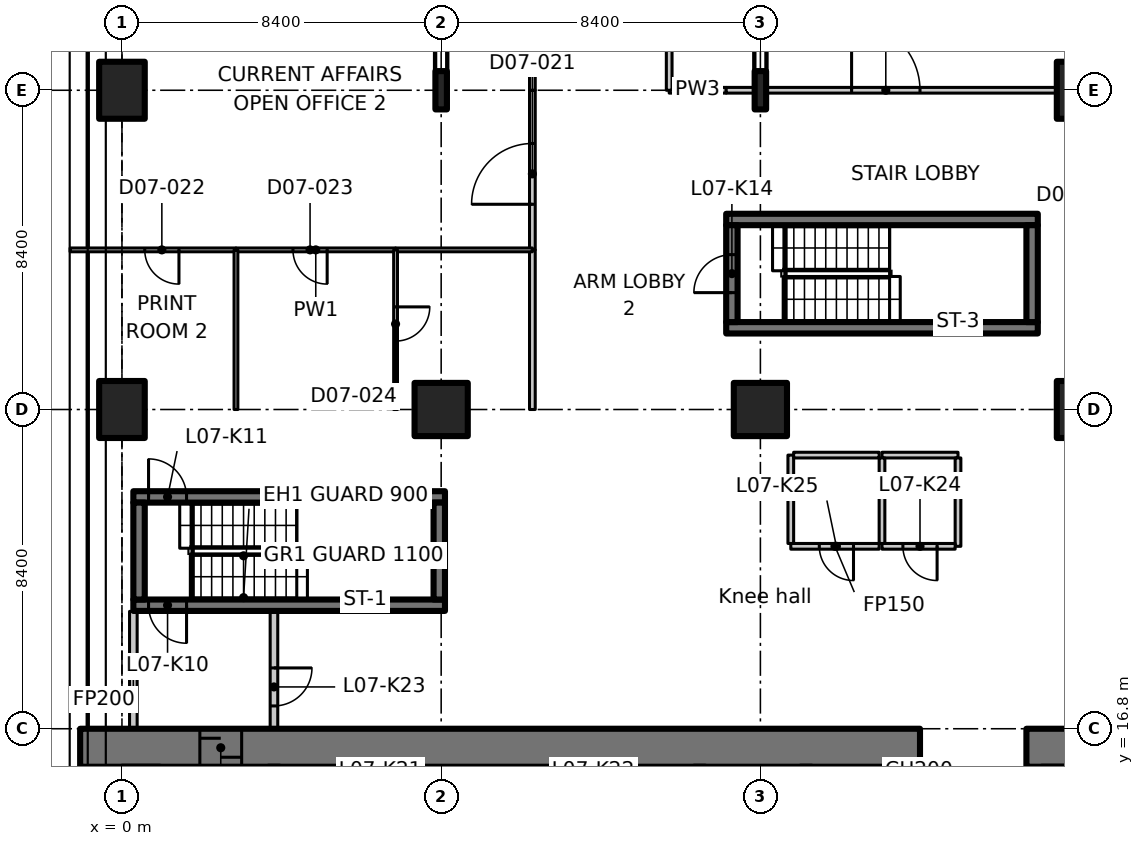
"""IFC4 building model, lengths in metres.
Left out: names, types, materials, properties, quantities, classifications, styles, units other than length and angle.
Written with IfcOpenShell. Run it as: python <this file> out.ifc"""

import sys

from ifc_helpers import new_model, si_unit, direction, frame, frame_2d, origin, origin_2d, place, context, subcontext, project, spatial, rectangle, i_section, extrude, element, fill, save


model = new_model("IFC4")
c1 = context("Model", 3, precision=1e-05, world=origin(), true_north=direction((0.0, 1.0)))
c2 = subcontext(c1, "Body", "Model", "MODEL_VIEW")
j1 = project(units=[si_unit("LENGTHUNIT", "METRE"), si_unit("PLANEANGLEUNIT", "RADIAN")], contexts=[c1])
p1 = place(None, origin())
s1 = spatial("IfcSite", under=j1, at=p1, CompositionType="ELEMENT")
p2 = place(p1, origin())
s2 = spatial("IfcBuilding", under=s1, at=p2, CompositionType="ELEMENT")
p3 = place(p2, frame((0.0, 0.0, 40.1)))
s3 = spatial("IfcBuildingStorey", under=s2, at=p3, CompositionType="ELEMENT", Elevation=40.1)
for number, where, z_axis, x_axis in (
    (1, (0.0, 25.2, 0.0), (0.0, 0.0, 1.0), (1.0, 0.0, 0.0)),
    (2, (0.0, 33.6, 0.0), (0.0, 0.0, 1.0), (1.0, 0.0, 0.0)),
):
    element("IfcColumn", number, at=place(p3, frame(where, z_axis=z_axis, x_axis=x_axis)), inside=s3, PredefinedType="COLUMN", context=c2, shape_type="SweptSolid", body=[
        extrude(rectangle(XDim=1.2, YDim=1.5, at=origin_2d()), origin(), (0.0, 0.0, 1.0), 3.35),
    ])
for number, where, z_axis, x_axis in (
    (3, (8.4, 25.2, 0.0), (0.0, 0.0, 1.0), (1.0, 0.0, 0.0)),
    (4, (16.8, 25.2, 0.0), (0.0, 0.0, 1.0), (1.0, 0.0, 0.0)),
):
    element("IfcColumn", number, at=place(p3, frame(where, z_axis=z_axis, x_axis=x_axis)), inside=s3, PredefinedType="COLUMN", context=c2, shape_type="SweptSolid", body=[
        extrude(rectangle(XDim=1.4, YDim=1.4, at=origin_2d()), origin(), (0.0, 0.0, 1.0), 3.35),
    ])
for number, where, z_axis, x_axis in (
    (5, (25.2, 25.2, 0.0), (0.0, 0.0, 1.0), (1.0, 0.0, 0.0)),
    (6, (25.2, 33.6, 0.0), (0.0, 0.0, 1.0), (1.0, 0.0, 0.0)),
):
    element("IfcColumn", number, at=place(p3, frame(where, z_axis=z_axis, x_axis=x_axis)), inside=s3, PredefinedType="COLUMN", context=c2, shape_type="SweptSolid", body=[
        extrude(rectangle(XDim=1.2, YDim=1.5, at=origin_2d()), origin(), (0.0, 0.0, 1.0), 3.35),
    ])
for number, where, z_axis, x_axis in (
    (7, (8.4, 33.6, -0.125), (0.0, 0.0, 1.0), (1.0, 0.0, 0.0)),
    (8, (16.8, 33.6, -0.125), (0.0, 0.0, 1.0), (1.0, 0.0, 0.0)),
):
    element("IfcColumn", number, at=place(p3, frame(where, z_axis=z_axis, x_axis=x_axis)), inside=s3, PredefinedType="COLUMN", context=c2, shape_type="SweptSolid", body=[
        extrude(i_section(OverallWidth=0.302, OverallDepth=1.008, WebThickness=0.021, FlangeThickness=0.04, FilletRadius=0.03, at=origin_2d()), origin(), (0.0, 0.0, 1.0), 3.475),
    ])
p4 = place(p3, frame((-1.1, 16.3, 0.0), z_axis=(0.0, 0.0, 1.0), x_axis=(1.0, 0.0, 0.0)))
e9 = element("IfcWall", 9, at=p4, inside=s3, PredefinedType="SHEAR", context=c2, shape_type="SweptSolid", body=[
    extrude(rectangle(XDim=22.1, YDim=1.0, at=frame_2d((11.05, 0.0))), origin(), (0.0, 0.0, 1.0), 3.35),
])
p5 = place(p4, frame((3.15, 0.0, 0.0)))
e10 = element("IfcOpeningElement", 10, at=p5, cuts=e9, PredefinedType="OPENING", context=c2, shape_type="SweptSolid", body=[
    extrude(rectangle(XDim=1.1, YDim=2.3, at=frame_2d((0.55, 1.15))), frame((0.0, 0.51, 0.0), z_axis=(0.0, -1.0, 0.0), x_axis=(1.0, 0.0, 0.0)), (0.0, 0.0, 1.0), 1.02),
])
p6 = place(p3, frame((23.8, 16.3, 0.0), z_axis=(0.0, 0.0, 1.0), x_axis=(1.0, 0.0, 0.0)))
e11 = element("IfcWall", 11, at=p6, inside=s3, PredefinedType="SHEAR", context=c2, shape_type="SweptSolid", body=[
    extrude(rectangle(XDim=1.4, YDim=1.0, at=frame_2d((0.7, 0.0))), origin(), (0.0, 0.0, 1.0), 3.35),
])
p7 = place(p3, frame((24.7, 12.6, 0.0), z_axis=(0.0, 0.0, 1.0), x_axis=(0.0, 1.0, 0.0)))
e12 = element("IfcWall", 12, at=p7, inside=s3, PredefinedType="SHEAR", context=c2, shape_type="SweptSolid", body=[
    extrude(rectangle(XDim=3.2, YDim=1.0, at=frame_2d((1.6, 0.0))), origin(), (0.0, 0.0, 1.0), 3.35),
])
p8 = place(p3, frame((8.5, 20.05, 0.0), z_axis=(0.0, 0.0, 1.0), x_axis=(-1.0, 0.0, 0.0)))
e13 = element("IfcWall", 13, at=p8, inside=s3, PredefinedType="SHEAR", context=c2, shape_type="SweptSolid", body=[
    extrude(rectangle(XDim=8.2, YDim=0.3, at=frame_2d((4.1, 0.0))), origin(), (0.0, 0.0, 1.0), 3.35),
])
p9 = place(p8, frame((6.8, 0.0, 0.0)))
e14 = element("IfcOpeningElement", 14, at=p9, cuts=e13, PredefinedType="OPENING", context=c2, shape_type="SweptSolid", body=[
    extrude(rectangle(XDim=1.0, YDim=2.1, at=frame_2d((0.5, 1.05))), frame((0.0, 0.16, 0.0), z_axis=(0.0, -1.0, 0.0), x_axis=(1.0, 0.0, 0.0)), (0.0, 0.0, 1.0), 0.32),
])
p10 = place(p3, frame((0.3, 22.9, 0.0), z_axis=(0.0, 0.0, 1.0), x_axis=(1.0, 0.0, 0.0)))
e15 = element("IfcWall", 15, at=p10, inside=s3, PredefinedType="SHEAR", context=c2, shape_type="SweptSolid", body=[
    extrude(rectangle(XDim=8.2, YDim=0.3, at=frame_2d((4.1, 0.0))), origin(), (0.0, 0.0, 1.0), 3.35),
])
p11 = place(p10, frame((0.4, 0.0, 0.0)))
e16 = element("IfcOpeningElement", 16, at=p11, cuts=e15, PredefinedType="OPENING", context=c2, shape_type="SweptSolid", body=[
    extrude(rectangle(XDim=1.0, YDim=2.1, at=frame_2d((0.5, 1.05))), frame((0.0, 0.16, 0.0), z_axis=(0.0, -1.0, 0.0), x_axis=(1.0, 0.0, 0.0)), (0.0, 0.0, 1.0), 0.32),
])
for number, where, z_axis, x_axis in (
    (17, (0.45, 20.2, 0.0), (0.0, 0.0, 1.0), (0.0, 1.0, 0.0)),
    (18, (8.35, 20.2, 0.0), (0.0, 0.0, 1.0), (0.0, 1.0, 0.0)),
):
    element("IfcWall", number, at=place(p3, frame(where, z_axis=z_axis, x_axis=x_axis)), inside=s3, PredefinedType="SHEAR", context=c2, shape_type="SweptSolid", body=[
        extrude(rectangle(XDim=2.55, YDim=0.3, at=frame_2d((1.275, 0.0))), origin(), (0.0, 0.0, 1.0), 3.35),
    ])
for number, where, z_axis, x_axis in (
    (19, (15.9, 27.35, 0.0), (0.0, 0.0, 1.0), (1.0, 0.0, 0.0)),
    (20, (15.9, 30.2, 0.0), (0.0, 0.0, 1.0), (1.0, 0.0, 0.0)),
):
    element("IfcWall", number, at=place(p3, frame(where, z_axis=z_axis, x_axis=x_axis)), inside=s3, PredefinedType="SHEAR", context=c2, shape_type="SweptSolid", body=[
        extrude(rectangle(XDim=8.2, YDim=0.3, at=frame_2d((4.1, 0.0))), origin(), (0.0, 0.0, 1.0), 3.35),
    ])
p12 = place(p3, frame((16.05, 27.5, 0.0), z_axis=(0.0, 0.0, 1.0), x_axis=(0.0, 1.0, 0.0)))
e21 = element("IfcWall", 21, at=p12, inside=s3, PredefinedType="SHEAR", context=c2, shape_type="SweptSolid", body=[
    extrude(rectangle(XDim=2.55, YDim=0.3, at=frame_2d((1.275, 0.0))), origin(), (0.0, 0.0, 1.0), 3.35),
])
p13 = place(p12, frame((0.775, 0.0, 0.0)))
e22 = element("IfcOpeningElement", 22, at=p13, cuts=e21, PredefinedType="OPENING", context=c2, shape_type="SweptSolid", body=[
    extrude(rectangle(XDim=1.0, YDim=2.1, at=frame_2d((0.5, 1.05))), frame((0.0, 0.16, 0.0), z_axis=(0.0, -1.0, 0.0), x_axis=(1.0, 0.0, 0.0)), (0.0, 0.0, 1.0), 0.32),
])
p14 = place(p3, frame((23.95, 27.5, 0.0), z_axis=(0.0, 0.0, 1.0), x_axis=(0.0, 1.0, 0.0)))
e23 = element("IfcWall", 23, at=p14, inside=s3, PredefinedType="SHEAR", context=c2, shape_type="SweptSolid", body=[
    extrude(rectangle(XDim=2.55, YDim=0.3, at=frame_2d((1.275, 0.0))), origin(), (0.0, 0.0, 1.0), 3.35),
])
p15 = place(p3, frame((0.3, 16.812, 0.0), z_axis=(0.0, 0.0, 1.0), x_axis=(0.0, 1.0, 0.0)))
e24 = element("IfcWall", 24, at=p15, inside=s3, PredefinedType="PARTITIONING", context=c2, shape_type="SweptSolid", body=[
    extrude(rectangle(XDim=3.076, YDim=0.2, at=frame_2d((1.538, 0.0))), origin(), (0.0, 0.0, 1.0), 2.98),
])
p16 = place(p3, frame((4.0, 19.888, 0.0), z_axis=(0.0, 0.0, 1.0), x_axis=(0.0, -1.0, 0.0)))
e25 = element("IfcWall", 25, at=p16, inside=s3, PredefinedType="PARTITIONING", context=c2, shape_type="SweptSolid", body=[
    extrude(rectangle(XDim=3.076, YDim=0.2, at=frame_2d((1.538, 0.0))), origin(), (0.0, 0.0, 1.0), 3.35),
])
p17 = place(p16, frame((1.488, 0.0, 0.0)))
e26 = element("IfcOpeningElement", 26, at=p17, cuts=e25, PredefinedType="OPENING", context=c2, shape_type="SweptSolid", body=[
    extrude(rectangle(XDim=1.0, YDim=2.1, at=frame_2d((0.5, 1.05))), frame((0.0, 0.11, 0.0), z_axis=(0.0, -1.0, 0.0), x_axis=(1.0, 0.0, 0.0)), (0.0, 0.0, 1.0), 0.22),
])
p18 = place(p3, frame((20.0, 24.0, 0.0), z_axis=(0.0, 0.0, 1.0), x_axis=(1.0, 0.0, 0.0)))
e27 = element("IfcWall", 27, at=p18, inside=s3, PredefinedType="PARTITIONING", context=c2, shape_type="SweptSolid", body=[
    extrude(rectangle(XDim=2.0, YDim=0.15, at=frame_2d((1.0, 0.0))), origin(), (0.0, 0.0, 1.0), 3.35),
])
p19 = place(p3, frame((22.0, 23.925, 0.0), z_axis=(0.0, 0.0, 1.0), x_axis=(0.0, -1.0, 0.0)))
e28 = element("IfcWall", 28, at=p19, inside=s3, PredefinedType="PARTITIONING", context=c2, shape_type="SweptSolid", body=[
    extrude(rectangle(XDim=2.325, YDim=0.15, at=frame_2d((1.163, 0.0))), origin(), (0.0, 0.0, 1.0), 3.35),
])
p20 = place(p3, frame((21.925, 21.6, 0.0), z_axis=(0.0, 0.0, 1.0), x_axis=(-1.0, 0.0, 0.0)))
e29 = element("IfcWall", 29, at=p20, inside=s3, PredefinedType="PARTITIONING", context=c2, shape_type="SweptSolid", body=[
    extrude(rectangle(XDim=1.925, YDim=0.15, at=frame_2d((0.962, 0.0))), origin(), (0.0, 0.0, 1.0), 3.35),
])
p21 = place(p20, frame((0.475, 0.0, 0.0)))
e30 = element("IfcOpeningElement", 30, at=p21, cuts=e29, PredefinedType="OPENING", context=c2, shape_type="SweptSolid", body=[
    extrude(rectangle(XDim=0.9, YDim=2.1, at=frame_2d((0.45, 1.05))), frame((0.0, 0.085, 0.0), z_axis=(0.0, -1.0, 0.0), x_axis=(1.0, 0.0, 0.0)), (0.0, 0.0, 1.0), 0.17),
])
p22 = place(p3, frame((20.0, 21.675, 0.0), z_axis=(0.0, 0.0, 1.0), x_axis=(0.0, 1.0, 0.0)))
e31 = element("IfcWall", 31, at=p22, inside=s3, PredefinedType="PARTITIONING", context=c2, shape_type="SweptSolid", body=[
    extrude(rectangle(XDim=2.25, YDim=0.15, at=frame_2d((1.125, 0.0))), origin(), (0.0, 0.0, 1.0), 3.35),
])
p23 = place(p3, frame((19.925, 21.6, 0.0), z_axis=(0.0, 0.0, 1.0), x_axis=(-1.0, 0.0, 0.0)))
e32 = element("IfcWall", 32, at=p23, inside=s3, PredefinedType="PARTITIONING", context=c2, shape_type="SweptSolid", body=[
    extrude(rectangle(XDim=2.325, YDim=0.15, at=frame_2d((1.163, 0.0))), origin(), (0.0, 0.0, 1.0), 3.35),
])
p24 = place(p23, frame((0.675, 0.0, 0.0)))
e33 = element("IfcOpeningElement", 33, at=p24, cuts=e32, PredefinedType="OPENING", context=c2, shape_type="SweptSolid", body=[
    extrude(rectangle(XDim=0.9, YDim=2.1, at=frame_2d((0.45, 1.05))), frame((0.0, 0.085, 0.0), z_axis=(0.0, -1.0, 0.0), x_axis=(1.0, 0.0, 0.0)), (0.0, 0.0, 1.0), 0.17),
])
p25 = place(p3, frame((17.6, 21.675, 0.0), z_axis=(0.0, 0.0, 1.0), x_axis=(0.0, 1.0, 0.0)))
e34 = element("IfcWall", 34, at=p25, inside=s3, PredefinedType="PARTITIONING", context=c2, shape_type="SweptSolid", body=[
    extrude(rectangle(XDim=2.325, YDim=0.15, at=frame_2d((1.163, 0.0))), origin(), (0.0, 0.0, 1.0), 3.35),
])
p26 = place(p3, frame((17.675, 24.0, 0.0), z_axis=(0.0, 0.0, 1.0), x_axis=(1.0, 0.0, 0.0)))
e35 = element("IfcWall", 35, at=p26, inside=s3, PredefinedType="PARTITIONING", context=c2, shape_type="SweptSolid", body=[
    extrude(rectangle(XDim=2.25, YDim=0.15, at=frame_2d((1.125, 0.0))), origin(), (0.0, 0.0, 1.0), 3.35),
])
p27 = place(p3, frame((10.8, 29.4, 0.0), z_axis=(0.0, 0.0, 1.0), x_axis=(0.0, 1.0, 0.0)))
e36 = element("IfcWall", 36, at=p27, inside=s3, PredefinedType="PARTITIONING", context=c2, shape_type="SweptSolid", body=[
    extrude(rectangle(XDim=4.2, YDim=0.15, at=frame_2d((2.1, 0.0))), origin(), (0.0, 0.0, 1.0), 3.33),
])
p28 = place(p27, frame((1.2, 0.0, 0.0)))
e37 = element("IfcOpeningElement", 37, at=p28, cuts=e36, PredefinedType="OPENING", context=c2, shape_type="SweptSolid", body=[
    extrude(rectangle(XDim=1.6, YDim=2.1, at=frame_2d((0.8, 1.05))), frame((0.0, 0.085, 0.0), z_axis=(0.0, -1.0, 0.0), x_axis=(1.0, 0.0, 0.0)), (0.0, 0.0, 1.0), 0.17),
])
p29 = place(p3, frame((10.8, 25.2, 0.0), z_axis=(0.0, 0.0, 1.0), x_axis=(0.0, 1.0, 0.0)))
e38 = element("IfcWall", 38, at=p29, inside=s3, PredefinedType="PARTITIONING", context=c2, shape_type="SweptSolid", body=[
    extrude(rectangle(XDim=4.2, YDim=0.15, at=frame_2d((2.1, 0.0))), origin(), (0.0, 0.0, 1.0), 3.33),
])
p30 = place(p3, frame((14.4, 33.6, 0.0), z_axis=(0.0, 0.0, 1.0), x_axis=(1.0, 0.0, 0.0)))
e39 = element("IfcWall", 39, at=p30, inside=s3, PredefinedType="PARTITIONING", context=c2, shape_type="SweptSolid", body=[
    extrude(rectangle(XDim=1.5, YDim=0.15, at=frame_2d((0.75, 0.0))), origin(), (0.0, 0.0, 1.0), 3.33),
])
p31 = place(p3, frame((15.9, 33.6, 0.0), z_axis=(0.0, 0.0, 1.0), x_axis=(1.0, 0.0, 0.0)))
e40 = element("IfcWall", 40, at=p31, inside=s3, PredefinedType="PARTITIONING", context=c2, shape_type="SweptSolid", body=[
    extrude(rectangle(XDim=8.68, YDim=0.15, at=frame_2d((4.34, 0.0))), origin(), (0.0, 0.0, 1.0), 3.33),
])
p32 = place(p31, frame((3.3, 0.0, 0.0)))
e41 = element("IfcOpeningElement", 41, at=p32, cuts=e40, PredefinedType="OPENING", context=c2, shape_type="SweptSolid", body=[
    extrude(rectangle(XDim=1.8, YDim=2.1, at=frame_2d((0.9, 1.05))), frame((0.0, 0.085, 0.0), z_axis=(0.0, -1.0, 0.0), x_axis=(1.0, 0.0, 0.0)), (0.0, 0.0, 1.0), 0.17),
])
p33 = place(p3, frame((10.8, 33.6, 0.0), z_axis=(0.0, 0.0, 1.0), x_axis=(0.0, 1.0, 0.0)))
e42 = element("IfcWall", 42, at=p33, inside=s3, PredefinedType="PARTITIONING", context=c2, shape_type="SweptSolid", body=[
    extrude(rectangle(XDim=4.2, YDim=0.15, at=frame_2d((2.1, 0.0))), origin(), (0.0, 0.0, 1.0), 3.33),
])
p34 = place(p3, frame((14.4, 42.0, 0.0), z_axis=(0.0, 0.0, 1.0), x_axis=(0.0, -1.0, 0.0)))
e43 = element("IfcWall", 43, at=p34, inside=s3, PredefinedType="PARTITIONING", context=c2, shape_type="SweptSolid", body=[
    extrude(rectangle(XDim=8.4, YDim=0.15, at=frame_2d((4.2, 0.0))), origin(), (0.0, 0.0, 1.0), 3.33),
])
p35 = place(p3, frame((3.0, 29.4, 0.0), z_axis=(0.0, 0.0, 1.0), x_axis=(-1.0, 0.0, 0.0)))
e44 = element("IfcWall", 44, at=p35, inside=s3, PredefinedType="PARTITIONING", context=c2, shape_type="SweptSolid", body=[
    extrude(rectangle(XDim=4.365, YDim=0.1, at=frame_2d((2.183, 0.0))), origin(), (0.0, 0.0, 1.0), 2.98),
])
p36 = place(p35, frame((1.5, 0.0, 0.0)))
e45 = element("IfcOpeningElement", 45, at=p36, cuts=e44, PredefinedType="OPENING", context=c2, shape_type="SweptSolid", body=[
    extrude(rectangle(XDim=0.9, YDim=2.1, at=frame_2d((0.45, 1.05))), frame((0.0, 0.06, 0.0), z_axis=(0.0, -1.0, 0.0), x_axis=(1.0, 0.0, 0.0)), (0.0, 0.0, 1.0), 0.12),
])
p37 = place(p3, frame((7.2, 29.4, 0.0), z_axis=(0.0, 0.0, 1.0), x_axis=(-1.0, 0.0, 0.0)))
e46 = element("IfcWall", 46, at=p37, inside=s3, PredefinedType="PARTITIONING", context=c2, shape_type="SweptSolid", body=[
    extrude(rectangle(XDim=4.2, YDim=0.1, at=frame_2d((2.1, 0.0))), origin(), (0.0, 0.0, 1.0), 3.33),
])
p38 = place(p37, frame((1.8, 0.0, 0.0)))
e47 = element("IfcOpeningElement", 47, at=p38, cuts=e46, PredefinedType="OPENING", context=c2, shape_type="SweptSolid", body=[
    extrude(rectangle(XDim=0.9, YDim=2.1, at=frame_2d((0.45, 1.05))), frame((0.0, 0.06, 0.0), z_axis=(0.0, -1.0, 0.0), x_axis=(1.0, 0.0, 0.0)), (0.0, 0.0, 1.0), 0.12),
])
p39 = place(p3, frame((10.8, 29.4, 0.0), z_axis=(0.0, 0.0, 1.0), x_axis=(-1.0, 0.0, 0.0)))
e48 = element("IfcWall", 48, at=p39, inside=s3, PredefinedType="PARTITIONING", context=c2, shape_type="SweptSolid", body=[
    extrude(rectangle(XDim=3.6, YDim=0.1, at=frame_2d((1.8, 0.0))), origin(), (0.0, 0.0, 1.0), 3.33),
])
p40 = place(p3, frame((3.0, 29.4, 0.0), z_axis=(0.0, 0.0, 1.0), x_axis=(0.0, -1.0, 0.0)))
e49 = element("IfcWall", 49, at=p40, inside=s3, PredefinedType="PARTITIONING", context=c2, shape_type="SweptSolid", body=[
    extrude(rectangle(XDim=4.2, YDim=0.1, at=frame_2d((2.1, 0.0))), origin(), (0.0, 0.0, 1.0), 3.33),
])
p41 = place(p3, frame((7.2, 29.4, 0.0), z_axis=(0.0, 0.0, 1.0), x_axis=(0.0, -1.0, 0.0)))
e50 = element("IfcWall", 50, at=p41, inside=s3, PredefinedType="PARTITIONING", context=c2, shape_type="SweptSolid", body=[
    extrude(rectangle(XDim=4.2, YDim=0.1, at=frame_2d((2.1, 0.0))), origin(), (0.0, 0.0, 1.0), 3.33),
])
p42 = place(p41, frame((1.5, 0.0, 0.0)))
e51 = element("IfcOpeningElement", 51, at=p42, cuts=e50, PredefinedType="OPENING", context=c2, shape_type="SweptSolid", body=[
    extrude(rectangle(XDim=0.9, YDim=2.1, at=frame_2d((0.45, 1.05))), frame((0.0, 0.06, 0.0), z_axis=(0.0, -1.0, 0.0), x_axis=(1.0, 0.0, 0.0)), (0.0, 0.0, 1.0), 0.12),
])
p43 = place(p5, origin())
e52 = element("IfcDoor", 52, at=p43, inside=s3, OperationType="SLIDING_TO_LEFT", PredefinedType="DOOR", context=c2, shape_type="SweptSolid", body=[
    extrude(rectangle(XDim=1.1, YDim=2.3, at=frame_2d((0.55, 1.15))), frame((0.0, 0.025, 0.0), z_axis=(0.0, -1.0, 0.0), x_axis=(1.0, 0.0, 0.0)), (0.0, 0.0, 1.0), 0.05),
])
fill(e10, e52)
p44 = place(p9, origin())
e53 = element("IfcDoor", 53, at=p44, inside=s3, OperationType="SINGLE_SWING_RIGHT", PredefinedType="DOOR", context=c2, shape_type="SweptSolid", body=[
    extrude(rectangle(XDim=1.0, YDim=2.1, at=frame_2d((0.5, 1.05))), frame((0.0, 0.025, 0.0), z_axis=(0.0, -1.0, 0.0), x_axis=(1.0, 0.0, 0.0)), (0.0, 0.0, 1.0), 0.05),
])
fill(e14, e53)
p45 = place(p11, origin())
e54 = element("IfcDoor", 54, at=p45, inside=s3, OperationType="SINGLE_SWING_LEFT", PredefinedType="DOOR", context=c2, shape_type="SweptSolid", body=[
    extrude(rectangle(XDim=1.0, YDim=2.1, at=frame_2d((0.5, 1.05))), frame((0.0, 0.025, 0.0), z_axis=(0.0, -1.0, 0.0), x_axis=(1.0, 0.0, 0.0)), (0.0, 0.0, 1.0), 0.05),
])
fill(e16, e54)
p46 = place(p13, origin())
e55 = element("IfcDoor", 55, at=p46, inside=s3, OperationType="SINGLE_SWING_RIGHT", PredefinedType="DOOR", context=c2, shape_type="SweptSolid", body=[
    extrude(rectangle(XDim=1.0, YDim=2.1, at=frame_2d((0.5, 1.05))), frame((0.0, 0.025, 0.0), z_axis=(0.0, -1.0, 0.0), x_axis=(1.0, 0.0, 0.0)), (0.0, 0.0, 1.0), 0.05),
])
fill(e22, e55)
p47 = place(p17, origin())
e56 = element("IfcDoor", 56, at=p47, inside=s3, OperationType="SINGLE_SWING_LEFT", PredefinedType="DOOR", context=c2, shape_type="SweptSolid", body=[
    extrude(rectangle(XDim=1.0, YDim=2.1, at=frame_2d((0.5, 1.05))), frame((0.0, 0.025, 0.0), z_axis=(0.0, -1.0, 0.0), x_axis=(1.0, 0.0, 0.0)), (0.0, 0.0, 1.0), 0.05),
])
fill(e26, e56)
p48 = place(p21, origin())
e57 = element("IfcDoor", 57, at=p48, inside=s3, OperationType="SINGLE_SWING_RIGHT", PredefinedType="DOOR", context=c2, shape_type="SweptSolid", body=[
    extrude(rectangle(XDim=0.9, YDim=2.1, at=frame_2d((0.45, 1.05))), frame((0.0, 0.025, 0.0), z_axis=(0.0, -1.0, 0.0), x_axis=(1.0, 0.0, 0.0)), (0.0, 0.0, 1.0), 0.05),
])
fill(e30, e57)
p49 = place(p24, origin())
e58 = element("IfcDoor", 58, at=p49, inside=s3, OperationType="SINGLE_SWING_LEFT", PredefinedType="DOOR", context=c2, shape_type="SweptSolid", body=[
    extrude(rectangle(XDim=0.9, YDim=2.1, at=frame_2d((0.45, 1.05))), frame((0.0, 0.025, 0.0), z_axis=(0.0, -1.0, 0.0), x_axis=(1.0, 0.0, 0.0)), (0.0, 0.0, 1.0), 0.05),
])
fill(e33, e58)
p50 = place(p28, origin())
e59 = element("IfcDoor", 59, at=p50, inside=s3, OperationType="DOUBLE_DOOR_SINGLE_SWING", PredefinedType="DOOR", context=c2, shape_type="SweptSolid", body=[
    extrude(rectangle(XDim=1.6, YDim=2.1, at=frame_2d((0.8, 1.05))), frame((0.0, 0.025, 0.0), z_axis=(0.0, -1.0, 0.0), x_axis=(1.0, 0.0, 0.0)), (0.0, 0.0, 1.0), 0.05),
])
fill(e37, e59)
p51 = place(p36, origin())
e60 = element("IfcDoor", 60, at=p51, inside=s3, OperationType="SINGLE_SWING_LEFT", PredefinedType="DOOR", context=c2, shape_type="SweptSolid", body=[
    extrude(rectangle(XDim=0.9, YDim=2.1, at=frame_2d((0.45, 1.05))), frame((0.0, 0.025, 0.0), z_axis=(0.0, -1.0, 0.0), x_axis=(1.0, 0.0, 0.0)), (0.0, 0.0, 1.0), 0.05),
])
fill(e45, e60)
p52 = place(p38, origin())
e61 = element("IfcDoor", 61, at=p52, inside=s3, OperationType="SINGLE_SWING_LEFT", PredefinedType="DOOR", context=c2, shape_type="SweptSolid", body=[
    extrude(rectangle(XDim=0.9, YDim=2.1, at=frame_2d((0.45, 1.05))), frame((0.0, 0.025, 0.0), z_axis=(0.0, -1.0, 0.0), x_axis=(1.0, 0.0, 0.0)), (0.0, 0.0, 1.0), 0.05),
])
fill(e47, e61)
p53 = place(p42, origin())
e62 = element("IfcDoor", 62, at=p53, inside=s3, OperationType="SINGLE_SWING_LEFT", PredefinedType="DOOR", context=c2, shape_type="SweptSolid", body=[
    extrude(rectangle(XDim=0.9, YDim=2.1, at=frame_2d((0.45, 1.05))), frame((0.0, 0.025, 0.0), z_axis=(0.0, -1.0, 0.0), x_axis=(1.0, 0.0, 0.0)), (0.0, 0.0, 1.0), 0.05),
])
fill(e51, e62)
p54 = place(p32, origin())
e63 = element("IfcDoor", 63, at=p54, inside=s3, OperationType="DOUBLE_DOOR_SINGLE_SWING", PredefinedType="DOOR", context=c2, shape_type="SweptSolid", body=[
    extrude(rectangle(XDim=1.8, YDim=2.1, at=frame_2d((0.9, 1.05))), frame((0.0, 0.025, 0.0), z_axis=(0.0, -1.0, 0.0), x_axis=(1.0, 0.0, 0.0)), (0.0, 0.0, 1.0), 0.05),
])
fill(e41, e63)
save(model, sys.argv[1])
